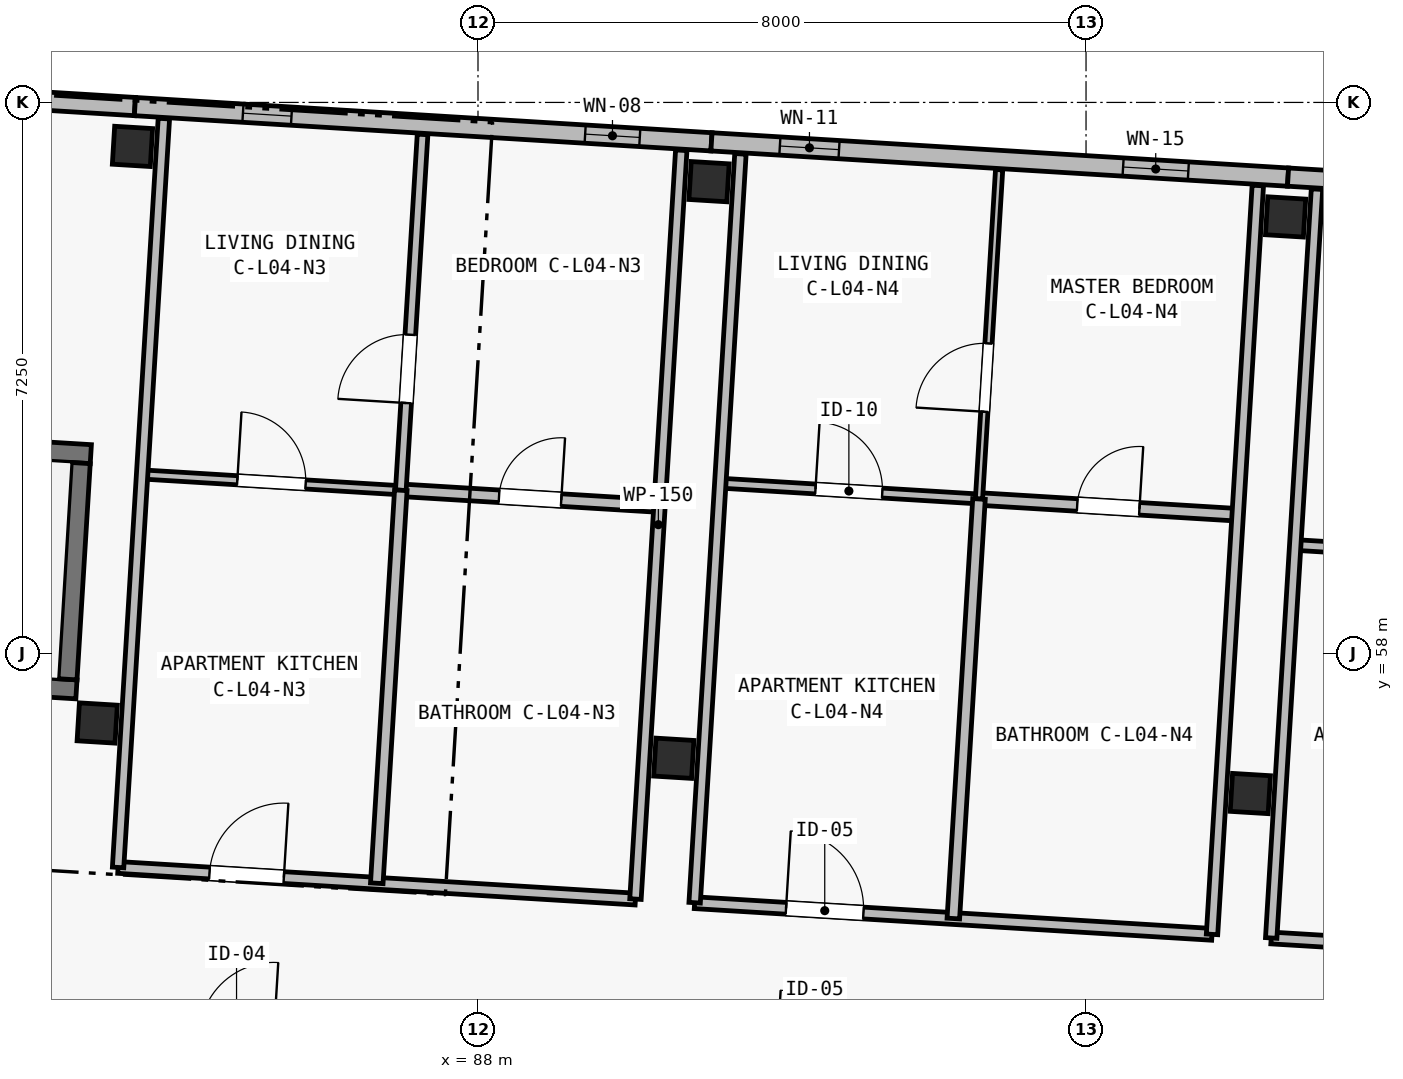
"""IFC4 building model, lengths in metres.
Left out: names, types, materials, properties, quantities, classifications, styles, units other than length and angle.
Written with IfcOpenShell. Run it as: python <this file> out.ifc"""

import sys

from ifc_helpers import new_model, si_unit, direction, frame, frame_2d, origin, origin_2d, place, context, subcontext, project, spatial, rectangle, extrude, element, fill, save


model = new_model("IFC4")
c1 = context("Model", 3, precision=1e-05, world=origin(), true_north=direction((0.0, 1.0)))
c2 = subcontext(c1, "Body", "Model", "MODEL_VIEW")
j1 = project(units=[si_unit("LENGTHUNIT", "METRE"), si_unit("PLANEANGLEUNIT", "RADIAN")], contexts=[c1])
p1 = place(None, origin())
s1 = spatial("IfcSite", under=j1, at=p1, CompositionType="ELEMENT")
p2 = place(p1, origin())
s2 = spatial("IfcBuilding", under=s1, at=p2, CompositionType="ELEMENT")
p3 = place(p2, frame((0.0, 0.0, 14.9)))
s3 = spatial("IfcBuildingStorey", under=s2, at=p3, CompositionType="ELEMENT", Elevation=14.9)
for number, where, z_axis, x_axis in (
    (1, (82.99, 57.086, 0.0), (0.0, 0.0, 1.0), (0.998, -0.061, 0.0)),
    (2, (83.454, 64.672, 0.0), (0.0, 0.0, 1.0), (0.998, -0.061, 0.0)),
    (3, (90.576, 56.622, 0.0), (0.0, 0.0, 1.0), (0.998, -0.061, 0.0)),
    (4, (91.04, 64.208, 0.0), (0.0, 0.0, 1.0), (0.998, -0.061, 0.0)),
    (5, (98.162, 56.158, 0.0), (0.0, 0.0, 1.0), (0.998, -0.061, 0.0)),
    (6, (98.626, 63.744, 0.0), (0.0, 0.0, 1.0), (0.998, -0.061, 0.0)),
):
    element("IfcColumn", number, at=place(p3, frame(where, z_axis=z_axis, x_axis=x_axis)), inside=s3, PredefinedType="COLUMN", context=c2, shape_type="SweptSolid", body=[
        extrude(rectangle(XDim=0.5, YDim=0.5, at=origin_2d()), origin(), (0.0, 0.0, 1.0), 3.25),
    ])
p4 = place(p3, frame((75.919, 61.05, 0.0), z_axis=(0.0, 0.0, 1.0), x_axis=(0.998135546153, -0.061036313012, 0.0)))
e7 = element("IfcWall", 7, at=p4, inside=s3, PredefinedType="SHEAR", context=c2, shape_type="SweptSolid", body=[
    extrude(rectangle(XDim=7.0, YDim=0.25, at=frame_2d((3.5, 0.0))), origin(), (0.0, 0.0, 1.0), 3.25),
])
p5 = place(p4, frame((0.45, 0.0, 0.0)))
e8 = element("IfcOpeningElement", 8, at=p5, cuts=e7, PredefinedType="OPENING", context=c2, shape_type="SweptSolid", body=[
    extrude(rectangle(XDim=0.9, YDim=2.1, at=frame_2d((0.45, 1.05))), frame((0.0, 0.14, 0.0), z_axis=(0.0, -1.0, 0.0), x_axis=(1.0, 0.0, 0.0)), (0.0, 0.0, 1.0), 0.28),
])
p6 = place(p3, frame((75.73, 57.956, 0.0), z_axis=(0.0, 0.0, 1.0), x_axis=(0.998135546153, -0.061036313012, 0.0)))
e9 = element("IfcWall", 9, at=p6, inside=s3, PredefinedType="SHEAR", context=c2, shape_type="SweptSolid", body=[
    extrude(rectangle(XDim=7.0, YDim=0.25, at=frame_2d((3.5, 0.0))), origin(), (0.0, 0.0, 1.0), 3.25),
])
p7 = place(p6, frame((0.45, 0.0, 0.0)))
e10 = element("IfcOpeningElement", 10, at=p7, cuts=e9, PredefinedType="OPENING", context=c2, shape_type="SweptSolid", body=[
    extrude(rectangle(XDim=1.05, YDim=2.15, at=frame_2d((0.525, 1.075))), frame((0.0, 0.14, 0.0), z_axis=(0.0, -1.0, 0.0), x_axis=(1.0, 0.0, 0.0)), (0.0, 0.0, 1.0), 0.28),
])
p8 = place(p3, frame((82.599, 57.661, 0.0), z_axis=(0.0, 0.0, 1.0), x_axis=(0.06107697143, 0.998133059046, 0.0)))
e11 = element("IfcWall", 11, at=p8, inside=s3, PredefinedType="SHEAR", context=c2, shape_type="SweptSolid", body=[
    extrude(rectangle(XDim=2.85, YDim=0.25, at=frame_2d((1.425, 0.0))), origin(), (0.0, 0.0, 1.0), 3.25),
])
p9 = place(p3, frame((81.115, 65.341, 0.0), z_axis=(0.0, 0.0, 1.0), x_axis=(0.998134103342, -0.061059902923, 0.0)))
e12 = element("IfcWall", 12, at=p9, inside=s3, PredefinedType="SOLIDWALL", context=c2, shape_type="SweptSolid", body=[
    extrude(rectangle(XDim=2.375, YDim=0.24, at=frame_2d((1.188, 0.0))), origin(), (0.0, 0.0, 1.0), 3.0),
])
p10 = place(p3, frame((83.486, 65.196, 0.0), z_axis=(0.0, 0.0, 1.0), x_axis=(0.998135669243, -0.061034300063, 0.0)))
e13 = element("IfcWall", 13, at=p10, inside=s3, PredefinedType="SOLIDWALL", context=c2, shape_type="SweptSolid", body=[
    extrude(rectangle(XDim=7.6, YDim=0.24, at=frame_2d((3.8, 0.0))), origin(), (0.0, 0.0, 1.0), 3.0),
])
p11 = place(p10, frame((1.424, 0.0, 0.5)))
e14 = element("IfcOpeningElement", 14, at=p11, cuts=e13, PredefinedType="OPENING", context=c2, shape_type="SweptSolid", body=[
    extrude(rectangle(XDim=0.64, YDim=2.18, at=frame_2d((0.32, 1.09))), frame((0.0, 0.135, 0.0), z_axis=(0.0, -1.0, 0.0), x_axis=(1.0, 0.0, 0.0)), (0.0, 0.0, 1.0), 0.27),
])
p12 = place(p10, frame((5.935, 0.0, 0.44)))
e15 = element("IfcOpeningElement", 15, at=p12, cuts=e13, PredefinedType="OPENING", context=c2, shape_type="SweptSolid", body=[
    extrude(rectangle(XDim=0.72, YDim=2.16, at=frame_2d((0.36, 1.08))), frame((0.0, 0.135, 0.0), z_axis=(0.0, -1.0, 0.0), x_axis=(1.0, 0.0, 0.0)), (0.0, 0.0, 1.0), 0.27),
])
p13 = place(p3, frame((91.072, 64.732, 0.0), z_axis=(0.0, 0.0, 1.0), x_axis=(0.998133591969, -0.061068261669, 0.0)))
e16 = element("IfcWall", 16, at=p13, inside=s3, PredefinedType="SOLIDWALL", context=c2, shape_type="SweptSolid", body=[
    extrude(rectangle(XDim=7.6, YDim=0.24, at=frame_2d((3.8, 0.0))), origin(), (0.0, 0.0, 1.0), 3.0),
])
p14 = place(p13, frame((0.902, 0.0, 0.44)))
e17 = element("IfcOpeningElement", 17, at=p14, cuts=e16, PredefinedType="OPENING", context=c2, shape_type="SweptSolid", body=[
    extrude(rectangle(XDim=0.78, YDim=2.2, at=frame_2d((0.39, 1.1))), frame((0.0, 0.135, 0.0), z_axis=(0.0, -1.0, 0.0), x_axis=(1.0, 0.0, 0.0)), (0.0, 0.0, 1.0), 0.27),
])
p15 = place(p13, frame((5.426, 0.0, 0.5)))
e18 = element("IfcOpeningElement", 18, at=p15, cuts=e16, PredefinedType="OPENING", context=c2, shape_type="SweptSolid", body=[
    extrude(rectangle(XDim=0.86, YDim=2.36, at=frame_2d((0.43, 1.18))), frame((0.0, 0.135, 0.0), z_axis=(0.0, -1.0, 0.0), x_axis=(1.0, 0.0, 0.0)), (0.0, 0.0, 1.0), 0.27),
])
p16 = place(p3, frame((98.658, 64.268, 0.0), z_axis=(0.0, 0.0, 1.0), x_axis=(0.998134248939, -0.061057522844, 0.0)))
e19 = element("IfcWall", 19, at=p16, inside=s3, PredefinedType="SOLIDWALL", context=c2, shape_type="SweptSolid", body=[
    extrude(rectangle(XDim=8.125, YDim=0.24, at=frame_2d((4.062, 0.0))), origin(), (0.0, 0.0, 1.0), 3.0),
])
p17 = place(p16, frame((1.901, 0.0, 0.5)))
e20 = element("IfcOpeningElement", 20, at=p17, cuts=e19, PredefinedType="OPENING", context=c2, shape_type="SweptSolid", body=[
    extrude(rectangle(XDim=0.62, YDim=2.28, at=frame_2d((0.31, 1.14))), frame((0.0, 0.135, 0.0), z_axis=(0.0, -1.0, 0.0), x_axis=(1.0, 0.0, 0.0)), (0.0, 0.0, 1.0), 0.27),
])
p18 = place(p16, frame((5.03, 0.0, 0.44)))
e21 = element("IfcOpeningElement", 21, at=p18, cuts=e19, PredefinedType="OPENING", context=c2, shape_type="SweptSolid", body=[
    extrude(rectangle(XDim=0.7, YDim=2.36, at=frame_2d((0.35, 1.18))), frame((0.0, 0.135, 0.0), z_axis=(0.0, -1.0, 0.0), x_axis=(1.0, 0.0, 0.0)), (0.0, 0.0, 1.0), 0.27),
])
p19 = place(p3, frame((78.415, 53.378, 0.0), z_axis=(0.0, 0.0, 1.0), x_axis=(0.998131852862, -0.061096679962, 0.0)))
e22 = element("IfcWall", 22, at=p19, inside=s3, PredefinedType="PARTITIONING", context=c2, shape_type="SweptSolid", body=[
    extrude(rectangle(XDim=4.08, YDim=0.155, at=frame_2d((2.04, 0.0))), origin(), (0.0, 0.0, 1.0), 2.97),
])
p20 = place(p19, frame((0.457, 0.0, 0.0)))
e23 = element("IfcOpeningElement", 23, at=p20, cuts=e22, PredefinedType="OPENING", context=c2, shape_type="SweptSolid", body=[
    extrude(rectangle(XDim=1.02, YDim=2.2, at=frame_2d((0.51, 1.1))), frame((0.0, 0.093, 0.0), z_axis=(0.0, -1.0, 0.0), x_axis=(1.0, 0.0, 0.0)), (0.0, 0.0, 1.0), 0.185),
])
p21 = place(p3, frame((83.265, 55.185, 0.0), z_axis=(0.0, 0.0, 1.0), x_axis=(0.998135531673, -0.061036549799, 0.0)))
e24 = element("IfcWall", 24, at=p21, inside=s3, PredefinedType="PARTITIONING", context=c2, shape_type="SweptSolid", body=[
    extrude(rectangle(XDim=6.82, YDim=0.155, at=frame_2d((3.41, 0.0))), origin(), (0.0, 0.0, 1.0), 2.97),
])
p22 = place(p21, frame((1.205, 0.0, 0.0)))
e25 = element("IfcOpeningElement", 25, at=p22, cuts=e24, PredefinedType="OPENING", context=c2, shape_type="SweptSolid", body=[
    extrude(rectangle(XDim=0.98, YDim=2.15, at=frame_2d((0.49, 1.075))), frame((0.0, 0.093, 0.0), z_axis=(0.0, -1.0, 0.0), x_axis=(1.0, 0.0, 0.0)), (0.0, 0.0, 1.0), 0.185),
])
p23 = place(p3, frame((83.581, 60.356, 0.0), z_axis=(0.0, 0.0, 1.0), x_axis=(0.998133350094, -0.061072214879, 0.0)))
e26 = element("IfcWall", 26, at=p23, inside=s3, PredefinedType="PARTITIONING", context=c2, shape_type="SweptSolid", body=[
    extrude(rectangle(XDim=3.41, YDim=0.12, at=frame_2d((1.705, 0.0))), origin(), (0.0, 0.0, 1.0), 2.97),
])
p24 = place(p23, frame((1.255, 0.0, 0.0)))
e27 = element("IfcOpeningElement", 27, at=p24, cuts=e26, PredefinedType="OPENING", context=c2, shape_type="SweptSolid", body=[
    extrude(rectangle(XDim=0.9, YDim=2.1, at=frame_2d((0.45, 1.05))), frame((0.0, 0.075, 0.0), z_axis=(0.0, -1.0, 0.0), x_axis=(1.0, 0.0, 0.0)), (0.0, 0.0, 1.0), 0.15),
])
p25 = place(p3, frame((86.984, 60.147, 0.0), z_axis=(0.0, 0.0, 1.0), x_axis=(0.99813797838, -0.060996525433, 0.0)))
e28 = element("IfcWall", 28, at=p25, inside=s3, PredefinedType="PLUMBINGWALL", context=c2, shape_type="SweptSolid", body=[
    extrude(rectangle(XDim=3.41, YDim=0.165, at=frame_2d((1.705, 0.0))), origin(), (0.0, 0.0, 1.0), 2.97),
])
p26 = place(p25, frame((1.295, 0.0, 0.0)))
e29 = element("IfcOpeningElement", 29, at=p26, cuts=e28, PredefinedType="OPENING", context=c2, shape_type="SweptSolid", body=[
    extrude(rectangle(XDim=0.82, YDim=2.08, at=frame_2d((0.41, 1.04))), frame((0.0, 0.097, 0.0), z_axis=(0.0, -1.0, 0.0), x_axis=(1.0, 0.0, 0.0)), (0.0, 0.0, 1.0), 0.195),
])
p27 = place(p3, frame((86.984, 60.147, 0.0), z_axis=(0.0, 0.0, 1.0), x_axis=(0.061059262019, 0.998134142549, 0.0)))
e30 = element("IfcWall", 30, at=p27, inside=s3, PredefinedType="PARTITIONING", context=c2, shape_type="SweptSolid", body=[
    extrude(rectangle(XDim=4.69, YDim=0.14, at=frame_2d((2.345, 0.0))), origin(), (0.0, 0.0, 1.0), 2.97),
])
p28 = place(p27, frame((1.15, 0.0, 0.0)))
e31 = element("IfcOpeningElement", 31, at=p28, cuts=e30, PredefinedType="OPENING", context=c2, shape_type="SweptSolid", body=[
    extrude(rectangle(XDim=0.9, YDim=2.1, at=frame_2d((0.45, 1.05))), frame((0.0, 0.085, 0.0), z_axis=(0.0, -1.0, 0.0), x_axis=(1.0, 0.0, 0.0)), (0.0, 0.0, 1.0), 0.17),
])
p29 = place(p3, frame((86.668, 54.977, 0.0), z_axis=(0.0, 0.0, 1.0), x_axis=(0.061037231879, 0.998135489963, 0.0)))
e32 = element("IfcWall", 32, at=p29, inside=s3, PredefinedType="PLUMBINGWALL", context=c2, shape_type="SweptSolid", body=[
    extrude(rectangle(XDim=5.18, YDim=0.165, at=frame_2d((2.59, 0.0))), origin(), (0.0, 0.0, 1.0), 2.97),
])
p30 = place(p3, frame((83.265, 55.185, 0.0), z_axis=(0.0, 0.0, 1.0), x_axis=(0.061046193261, 0.998134941923, 0.0)))
e33 = element("IfcWall", 33, at=p30, inside=s3, PredefinedType="PARTITIONING", context=c2, shape_type="SweptSolid", body=[
    extrude(rectangle(XDim=9.87, YDim=0.15, at=frame_2d((4.935, 0.0))), origin(), (0.0, 0.0, 1.0), 2.97),
])
p31 = place(p3, frame((90.072, 54.769, 0.0), z_axis=(0.0, 0.0, 1.0), x_axis=(0.061047700465, 0.998134849741, 0.0)))
e34 = element("IfcWall", 34, at=p31, inside=s3, PredefinedType="PARTITIONING", context=c2, shape_type="SweptSolid", body=[
    extrude(rectangle(XDim=9.87, YDim=0.15, at=frame_2d((4.935, 0.0))), origin(), (0.0, 0.0, 1.0), 2.97),
])
p32 = place(p3, frame((90.85, 54.721, 0.0), z_axis=(0.0, 0.0, 1.0), x_axis=(0.998135665032, -0.06103436893, 0.0)))
e35 = element("IfcWall", 35, at=p32, inside=s3, PredefinedType="PARTITIONING", context=c2, shape_type="SweptSolid", body=[
    extrude(rectangle(XDim=6.82, YDim=0.155, at=frame_2d((3.41, 0.0))), origin(), (0.0, 0.0, 1.0), 2.97),
])
p33 = place(p32, frame((1.205, 0.0, 0.0)))
e36 = element("IfcOpeningElement", 36, at=p33, cuts=e35, PredefinedType="OPENING", context=c2, shape_type="SweptSolid", body=[
    extrude(rectangle(XDim=1.02, YDim=2.2, at=frame_2d((0.51, 1.1))), frame((0.0, 0.093, 0.0), z_axis=(0.0, -1.0, 0.0), x_axis=(1.0, 0.0, 0.0)), (0.0, 0.0, 1.0), 0.185),
])
p34 = place(p3, frame((91.188, 60.241, 0.0), z_axis=(0.0, 0.0, 1.0), x_axis=(0.998133350094, -0.061072214879, 0.0)))
e37 = element("IfcWall", 37, at=p34, inside=s3, PredefinedType="PARTITIONING", context=c2, shape_type="SweptSolid", body=[
    extrude(rectangle(XDim=3.41, YDim=0.13, at=frame_2d((1.705, 0.0))), origin(), (0.0, 0.0, 1.0), 2.97),
])
p35 = place(p34, frame((1.255, 0.0, 0.0)))
e38 = element("IfcOpeningElement", 38, at=p35, cuts=e37, PredefinedType="OPENING", context=c2, shape_type="SweptSolid", body=[
    extrude(rectangle(XDim=0.88, YDim=2.1, at=frame_2d((0.44, 1.05))), frame((0.0, 0.08, 0.0), z_axis=(0.0, -1.0, 0.0), x_axis=(1.0, 0.0, 0.0)), (0.0, 0.0, 1.0), 0.16),
])
p36 = place(p3, frame((94.592, 60.033, 0.0), z_axis=(0.0, 0.0, 1.0), x_axis=(0.998133617109, -0.061067850767, 0.0)))
e39 = element("IfcWall", 39, at=p36, inside=s3, PredefinedType="PLUMBINGWALL", context=c2, shape_type="SweptSolid", body=[
    extrude(rectangle(XDim=3.41, YDim=0.165, at=frame_2d((1.705, 0.0))), origin(), (0.0, 0.0, 1.0), 2.97),
])
p37 = place(p36, frame((1.295, 0.0, 0.0)))
e40 = element("IfcOpeningElement", 40, at=p37, cuts=e39, PredefinedType="OPENING", context=c2, shape_type="SweptSolid", body=[
    extrude(rectangle(XDim=0.82, YDim=2.08, at=frame_2d((0.41, 1.04))), frame((0.0, 0.097, 0.0), z_axis=(0.0, -1.0, 0.0), x_axis=(1.0, 0.0, 0.0)), (0.0, 0.0, 1.0), 0.195),
])
p38 = place(p3, frame((94.592, 60.033, 0.0), z_axis=(0.0, 0.0, 1.0), x_axis=(0.061092906669, 0.998132083822, 0.0)))
e41 = element("IfcWall", 41, at=p38, inside=s3, PredefinedType="PARTITIONING", context=c2, shape_type="SweptSolid", body=[
    extrude(rectangle(XDim=4.34, YDim=0.095, at=frame_2d((2.17, 0.0))), origin(), (0.0, 0.0, 1.0), 2.97),
])
p39 = place(p38, frame((1.15, 0.0, 0.0)))
e42 = element("IfcOpeningElement", 42, at=p39, cuts=e41, PredefinedType="OPENING", context=c2, shape_type="SweptSolid", body=[
    extrude(rectangle(XDim=0.9, YDim=2.1, at=frame_2d((0.45, 1.05))), frame((0.0, 0.062, 0.0), z_axis=(0.0, -1.0, 0.0), x_axis=(1.0, 0.0, 0.0)), (0.0, 0.0, 1.0), 0.125),
])
p40 = place(p3, frame((94.254, 54.513, 0.0), z_axis=(0.0, 0.0, 1.0), x_axis=(0.061056206715, 0.998134329447, 0.0)))
e43 = element("IfcWall", 43, at=p40, inside=s3, PredefinedType="PLUMBINGWALL", context=c2, shape_type="SweptSolid", body=[
    extrude(rectangle(XDim=5.53, YDim=0.165, at=frame_2d((2.765, 0.0))), origin(), (0.0, 0.0, 1.0), 2.97),
])
for number, where, z_axis, x_axis in (
    (44, (90.85, 54.721, 0.0), (0.0, 0.0, 1.0), (0.061, 0.998, 0.0)),
    (45, (97.658, 54.305, 0.0), (0.0, 0.0, 1.0), (0.061, 0.998, 0.0)),
):
    element("IfcWall", number, at=place(p3, frame(where, z_axis=z_axis, x_axis=x_axis)), inside=s3, PredefinedType="PARTITIONING", context=c2, shape_type="SweptSolid", body=[
        extrude(rectangle(XDim=9.87, YDim=0.15, at=frame_2d((4.935, 0.0))), origin(), (0.0, 0.0, 1.0), 2.97),
    ])
p41 = place(p3, frame((98.436, 54.258, 0.0), z_axis=(0.0, 0.0, 1.0), x_axis=(0.998133350094, -0.061072214879, 0.0)))
e46 = element("IfcWall", 46, at=p41, inside=s3, PredefinedType="PARTITIONING", context=c2, shape_type="SweptSolid", body=[
    extrude(rectangle(XDim=6.82, YDim=0.155, at=frame_2d((3.41, 0.0))), origin(), (0.0, 0.0, 1.0), 2.97),
])
p42 = place(p41, frame((1.205, 0.0, 0.0)))
e47 = element("IfcOpeningElement", 47, at=p42, cuts=e46, PredefinedType="OPENING", context=c2, shape_type="SweptSolid", body=[
    extrude(rectangle(XDim=0.98, YDim=2.15, at=frame_2d((0.49, 1.075))), frame((0.0, 0.093, 0.0), z_axis=(0.0, -1.0, 0.0), x_axis=(1.0, 0.0, 0.0)), (0.0, 0.0, 1.0), 0.185),
])
p43 = place(p3, frame((98.752, 59.428, 0.0), z_axis=(0.0, 0.0, 1.0), x_axis=(0.998137711988, -0.061000884486, 0.0)))
e48 = element("IfcWall", 48, at=p43, inside=s3, PredefinedType="PARTITIONING", context=c2, shape_type="SweptSolid", body=[
    extrude(rectangle(XDim=3.41, YDim=0.14, at=frame_2d((1.705, 0.0))), origin(), (0.0, 0.0, 1.0), 2.97),
])
p44 = place(p43, frame((1.255, 0.0, 0.0)))
e49 = element("IfcOpeningElement", 49, at=p44, cuts=e48, PredefinedType="OPENING", context=c2, shape_type="SweptSolid", body=[
    extrude(rectangle(XDim=0.9, YDim=2.1, at=frame_2d((0.45, 1.05))), frame((0.0, 0.085, 0.0), z_axis=(0.0, -1.0, 0.0), x_axis=(1.0, 0.0, 0.0)), (0.0, 0.0, 1.0), 0.17),
])
p45 = place(p3, frame((98.436, 54.258, 0.0), z_axis=(0.0, 0.0, 1.0), x_axis=(0.061047700465, 0.998134849741, 0.0)))
e50 = element("IfcWall", 50, at=p45, inside=s3, PredefinedType="PARTITIONING", context=c2, shape_type="SweptSolid", body=[
    extrude(rectangle(XDim=9.87, YDim=0.15, at=frame_2d((4.935, 0.0))), origin(), (0.0, 0.0, 1.0), 2.97),
])
p46 = place(p11, origin())
e51 = element("IfcWindow", 51, at=p46, inside=s3, PartitioningType="SINGLE_PANEL", PredefinedType="WINDOW", context=c2, shape_type="SweptSolid", body=[
    extrude(rectangle(XDim=0.64, YDim=2.18, at=frame_2d((0.32, 1.09))), frame((0.0, 0.03, 0.0), z_axis=(0.0, -1.0, 0.0), x_axis=(1.0, 0.0, 0.0)), (0.0, 0.0, 1.0), 0.06),
])
fill(e14, e51)
p47 = place(p12, origin())
e52 = element("IfcWindow", 52, at=p47, inside=s3, PartitioningType="SINGLE_PANEL", PredefinedType="WINDOW", context=c2, shape_type="SweptSolid", body=[
    extrude(rectangle(XDim=0.72, YDim=2.16, at=frame_2d((0.36, 1.08))), frame((0.0, 0.03, 0.0), z_axis=(0.0, -1.0, 0.0), x_axis=(1.0, 0.0, 0.0)), (0.0, 0.0, 1.0), 0.06),
])
fill(e15, e52)
p48 = place(p14, origin())
e53 = element("IfcWindow", 53, at=p48, inside=s3, PartitioningType="SINGLE_PANEL", PredefinedType="WINDOW", context=c2, shape_type="SweptSolid", body=[
    extrude(rectangle(XDim=0.78, YDim=2.2, at=frame_2d((0.39, 1.1))), frame((0.0, 0.03, 0.0), z_axis=(0.0, -1.0, 0.0), x_axis=(1.0, 0.0, 0.0)), (0.0, 0.0, 1.0), 0.06),
])
fill(e17, e53)
p49 = place(p15, origin())
e54 = element("IfcWindow", 54, at=p49, inside=s3, PartitioningType="SINGLE_PANEL", PredefinedType="WINDOW", context=c2, shape_type="SweptSolid", body=[
    extrude(rectangle(XDim=0.86, YDim=2.36, at=frame_2d((0.43, 1.18))), frame((0.0, 0.03, 0.0), z_axis=(0.0, -1.0, 0.0), x_axis=(1.0, 0.0, 0.0)), (0.0, 0.0, 1.0), 0.06),
])
fill(e18, e54)
p50 = place(p22, origin())
e55 = element("IfcDoor", 55, at=p50, inside=s3, OperationType="SINGLE_SWING_RIGHT", PredefinedType="DOOR", context=c2, shape_type="SweptSolid", body=[
    extrude(rectangle(XDim=0.98, YDim=2.15, at=frame_2d((0.49, 1.075))), frame((0.0, 0.025, 0.0), z_axis=(0.0, -1.0, 0.0), x_axis=(1.0, 0.0, 0.0)), (0.0, 0.0, 1.0), 0.05),
])
fill(e25, e55)
p51 = place(p24, origin())
e56 = element("IfcDoor", 56, at=p51, inside=s3, OperationType="SINGLE_SWING_LEFT", PredefinedType="DOOR", context=c2, shape_type="SweptSolid", body=[
    extrude(rectangle(XDim=0.9, YDim=2.1, at=frame_2d((0.45, 1.05))), frame((0.0, 0.025, 0.0), z_axis=(0.0, -1.0, 0.0), x_axis=(1.0, 0.0, 0.0)), (0.0, 0.0, 1.0), 0.05),
])
fill(e27, e56)
p52 = place(p26, origin())
e57 = element("IfcDoor", 57, at=p52, inside=s3, OperationType="SINGLE_SWING_RIGHT", PredefinedType="DOOR", context=c2, shape_type="SweptSolid", body=[
    extrude(rectangle(XDim=0.82, YDim=2.08, at=frame_2d((0.41, 1.04))), frame((0.0, 0.025, 0.0), z_axis=(0.0, -1.0, 0.0), x_axis=(1.0, 0.0, 0.0)), (0.0, 0.0, 1.0), 0.05),
])
fill(e29, e57)
p53 = place(p28, origin())
e58 = element("IfcDoor", 58, at=p53, inside=s3, OperationType="SINGLE_SWING_LEFT", PredefinedType="DOOR", context=c2, shape_type="SweptSolid", body=[
    extrude(rectangle(XDim=0.9, YDim=2.1, at=frame_2d((0.45, 1.05))), frame((0.0, 0.025, 0.0), z_axis=(0.0, -1.0, 0.0), x_axis=(1.0, 0.0, 0.0)), (0.0, 0.0, 1.0), 0.05),
])
fill(e31, e58)
p54 = place(p33, origin())
e59 = element("IfcDoor", 59, at=p54, inside=s3, OperationType="SINGLE_SWING_LEFT", PredefinedType="DOOR", context=c2, shape_type="SweptSolid", body=[
    extrude(rectangle(XDim=1.02, YDim=2.2, at=frame_2d((0.51, 1.1))), frame((0.0, 0.025, 0.0), z_axis=(0.0, -1.0, 0.0), x_axis=(1.0, 0.0, 0.0)), (0.0, 0.0, 1.0), 0.05),
])
fill(e36, e59)
p55 = place(p35, origin())
e60 = element("IfcDoor", 60, at=p55, inside=s3, OperationType="SINGLE_SWING_LEFT", PredefinedType="DOOR", context=c2, shape_type="SweptSolid", body=[
    extrude(rectangle(XDim=0.88, YDim=2.1, at=frame_2d((0.44, 1.05))), frame((0.0, 0.025, 0.0), z_axis=(0.0, -1.0, 0.0), x_axis=(1.0, 0.0, 0.0)), (0.0, 0.0, 1.0), 0.05),
])
fill(e38, e60)
p56 = place(p37, origin())
e61 = element("IfcDoor", 61, at=p56, inside=s3, OperationType="SINGLE_SWING_RIGHT", PredefinedType="DOOR", context=c2, shape_type="SweptSolid", body=[
    extrude(rectangle(XDim=0.82, YDim=2.08, at=frame_2d((0.41, 1.04))), frame((0.0, 0.025, 0.0), z_axis=(0.0, -1.0, 0.0), x_axis=(1.0, 0.0, 0.0)), (0.0, 0.0, 1.0), 0.05),
])
fill(e40, e61)
p57 = place(p39, origin())
e62 = element("IfcDoor", 62, at=p57, inside=s3, OperationType="SINGLE_SWING_LEFT", PredefinedType="DOOR", context=c2, shape_type="SweptSolid", body=[
    extrude(rectangle(XDim=0.9, YDim=2.1, at=frame_2d((0.45, 1.05))), frame((0.0, 0.025, 0.0), z_axis=(0.0, -1.0, 0.0), x_axis=(1.0, 0.0, 0.0)), (0.0, 0.0, 1.0), 0.05),
])
fill(e42, e62)
save(model, sys.argv[1])
